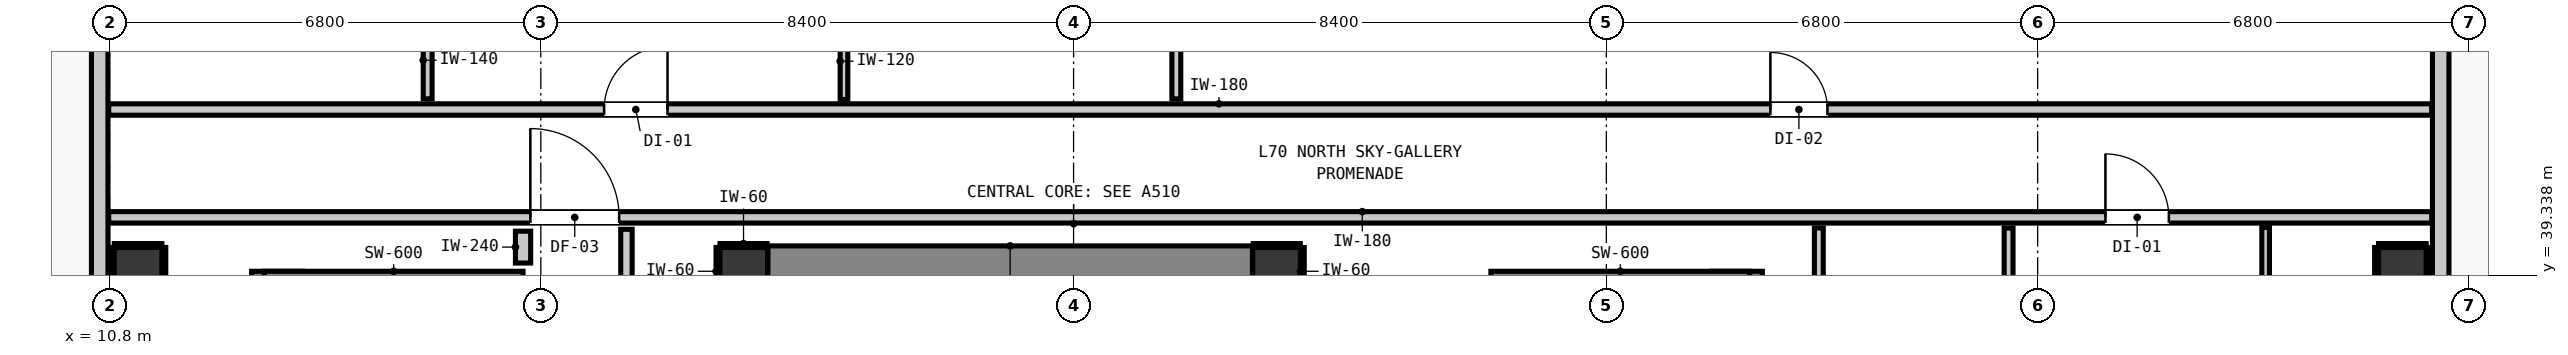
"""IFC4 building model, lengths in metres.
Left out: names, types, materials, properties, quantities, classifications, styles, units other than length and angle.
Written with IfcOpenShell. Run it as: python <this file> out.ifc"""

import sys

from ifc_helpers import new_model, si_unit, direction, frame, frame_2d, origin, origin_2d, place, context, subcontext, project, spatial, rectangle, extrude, element, fill, save


model = new_model("IFC4")
c1 = context("Model", 3, precision=1e-05, world=origin(), true_north=direction((0.0, 1.0)))
c2 = subcontext(c1, "Body", "Model", "MODEL_VIEW")
j1 = project(units=[si_unit("LENGTHUNIT", "METRE"), si_unit("PLANEANGLEUNIT", "RADIAN")], contexts=[c1])
p1 = place(None, origin())
s1 = spatial("IfcSite", under=j1, at=p1, CompositionType="ELEMENT")
p2 = place(p1, origin())
s2 = spatial("IfcBuilding", under=s1, at=p2, CompositionType="ELEMENT")
p3 = place(p2, frame((0.0, 0.0, 241.24)))
s3 = spatial("IfcBuildingStorey", under=s2, at=p3, CompositionType="ELEMENT", Elevation=241.24)
for number, where, z_axis, x_axis in (
    (1, (20.8, 39.4, 0.0), (0.0, 0.0, 1.0), (1.0, 0.0, 0.0)),
    (2, (29.2, 39.4, 0.0), (0.0, 0.0, 1.0), (1.0, 0.0, 0.0)),
):
    element("IfcColumn", number, at=place(p3, frame(where, z_axis=z_axis, x_axis=x_axis)), inside=s3, PredefinedType="COLUMN", context=c2, shape_type="SweptSolid", body=[
        extrude(rectangle(XDim=0.75, YDim=0.75, at=origin_2d()), origin(), (0.0, 0.0, 1.0), 3.32),
    ])
p4 = place(p3, frame((13.44, 31.08, 0.0), z_axis=(0.0, 0.0, 1.0), x_axis=(0.0, 1.0, 0.0)))
e3 = element("IfcWall", 3, at=p4, inside=s3, PredefinedType="SHEAR", context=c2, shape_type="SweptSolid", body=[
    extrude(rectangle(XDim=8.32, YDim=0.8, at=frame_2d((4.16, 0.0))), origin(), (0.0, 0.0, 1.0), 3.32),
])
p5 = place(p3, frame((13.24, 39.1, 0.0), z_axis=(0.0, 0.0, 1.0), x_axis=(1.0, 0.0, 0.0)))
e4 = element("IfcWall", 4, at=p5, inside=s3, PredefinedType="SHEAR", context=c2, shape_type="SweptSolid", body=[
    extrude(rectangle(XDim=4.08, YDim=0.6, at=frame_2d((2.04, 0.0))), origin(), (0.0, 0.0, 1.0), 3.32),
])
p6 = place(p3, frame((36.46, 31.08, 0.0), z_axis=(0.0, 0.0, 1.0), x_axis=(0.0, 1.0, 0.0)))
e5 = element("IfcWall", 5, at=p6, inside=s3, PredefinedType="SHEAR", context=c2, shape_type="SweptSolid", body=[
    extrude(rectangle(XDim=8.32, YDim=0.8, at=frame_2d((4.16, 0.0))), origin(), (0.0, 0.0, 1.0), 3.32),
])
p7 = place(p3, frame((32.58, 39.1, 0.0), z_axis=(0.0, 0.0, 1.0), x_axis=(1.0, 0.0, 0.0)))
e6 = element("IfcWall", 6, at=p7, inside=s3, PredefinedType="SHEAR", context=c2, shape_type="SweptSolid", body=[
    extrude(rectangle(XDim=4.08, YDim=0.6, at=frame_2d((2.04, 0.0))), origin(), (0.0, 0.0, 1.0), 3.32),
])
p8 = place(p3, frame((21.18, 39.4, 0.0), z_axis=(0.0, 0.0, 1.0), x_axis=(1.0, 0.0, 0.0)))
e7 = element("IfcWall", 7, at=p8, inside=s3, PredefinedType="SHEAR", context=c2, shape_type="SweptSolid", body=[
    extrude(rectangle(XDim=7.64, YDim=0.8, at=frame_2d((3.82, 0.0))), origin(), (0.0, 0.0, 1.0), 3.32),
])
for number, where, z_axis, x_axis in (
    (8, (11.25, 39.4, 0.0), (0.0, 0.0, 1.0), (1.0, 0.0, 0.0)),
    (9, (46.95, 39.4, 0.0), (0.0, 0.0, 1.0), (1.0, 0.0, 0.0)),
):
    element("IfcColumn", number, at=place(p3, frame(where, z_axis=z_axis, x_axis=x_axis)), inside=s3, PredefinedType="COLUMN", context=c2, shape_type="SweptSolid", body=[
        extrude(rectangle(XDim=0.75, YDim=0.75, at=origin_2d()), origin(), (0.0, 0.0, 1.0), 3.32),
    ])
p9 = place(p3, frame((10.645, 18.545, 0.0), z_axis=(0.0, 0.0, 1.0), x_axis=(0.0, 1.0, 0.0)))
e10 = element("IfcWall", 10, at=p9, inside=s3, PredefinedType="STANDARD", context=c2, shape_type="SweptSolid", body=[
    extrude(rectangle(XDim=30.31, YDim=0.26, at=frame_2d((15.155, 0.0))), origin(), (0.0, 0.0, 1.0), 3.1),
])
p10 = place(p9, frame((27.695, 0.0, 0.0)))
e11 = element("IfcOpeningElement", 11, at=p10, cuts=e10, PredefinedType="OPENING", context=c2, shape_type="SweptSolid", body=[
    extrude(rectangle(XDim=1.0, YDim=2.15, at=frame_2d((0.5, 1.075))), frame((0.0, 0.14, 0.0), z_axis=(0.0, -1.0, 0.0), x_axis=(1.0, 0.0, 0.0)), (0.0, 0.0, 1.0), 0.28),
])
p11 = place(p9, frame((29.108, 0.0, 0.85)))
e12 = element("IfcOpeningElement", 12, at=p11, cuts=e10, PredefinedType="OPENING", context=c2, shape_type="SweptSolid", body=[
    extrude(rectangle(XDim=0.9, YDim=1.5, at=frame_2d((0.45, 0.75))), frame((0.0, 0.14, 0.0), z_axis=(0.0, -1.0, 0.0), x_axis=(1.0, 0.0, 0.0)), (0.0, 0.0, 1.0), 0.28),
])
p12 = place(p3, frame((47.555, 48.855, 0.0), z_axis=(0.0, 0.0, 1.0), x_axis=(0.0, -1.0, 0.0)))
e13 = element("IfcWall", 13, at=p12, inside=s3, PredefinedType="STANDARD", context=c2, shape_type="SweptSolid", body=[
    extrude(rectangle(XDim=30.31, YDim=0.26, at=frame_2d((15.155, 0.0))), origin(), (0.0, 0.0, 1.0), 3.1),
])
p13 = place(p12, frame((0.91, 0.0, 0.0)))
e14 = element("IfcOpeningElement", 14, at=p13, cuts=e13, PredefinedType="OPENING", context=c2, shape_type="SweptSolid", body=[
    extrude(rectangle(XDim=1.0, YDim=2.15, at=frame_2d((0.5, 1.075))), frame((0.0, 0.14, 0.0), z_axis=(0.0, -1.0, 0.0), x_axis=(1.0, 0.0, 0.0)), (0.0, 0.0, 1.0), 0.28),
])
p14 = place(p12, frame((2.957, 0.0, 0.85)))
e15 = element("IfcOpeningElement", 15, at=p14, cuts=e13, PredefinedType="OPENING", context=c2, shape_type="SweptSolid", body=[
    extrude(rectangle(XDim=3.0, YDim=2.1, at=frame_2d((1.5, 1.05))), frame((0.0, 0.14, 0.0), z_axis=(0.0, -1.0, 0.0), x_axis=(1.0, 0.0, 0.0)), (0.0, 0.0, 1.0), 0.28),
])
p15 = place(p12, frame((21.005, 0.0, 0.85)))
e16 = element("IfcOpeningElement", 16, at=p15, cuts=e13, PredefinedType="OPENING", context=c2, shape_type="SweptSolid", body=[
    extrude(rectangle(XDim=3.0, YDim=2.1, at=frame_2d((1.5, 1.05))), frame((0.0, 0.14, 0.0), z_axis=(0.0, -1.0, 0.0), x_axis=(1.0, 0.0, 0.0)), (0.0, 0.0, 1.0), 0.28),
])
p16 = place(p3, frame((10.787, 40.25, 0.0), z_axis=(0.0, 0.0, 1.0), x_axis=(1.0, 0.0, 0.0)))
e17 = element("IfcWall", 17, at=p16, inside=s3, PredefinedType="PARTITIONING", context=c2, shape_type="SweptSolid", body=[
    extrude(rectangle(XDim=36.626, YDim=0.18, at=frame_2d((18.313, 0.0))), origin(), (0.0, 0.0, 1.0), 3.1),
])
p17 = place(p16, frame((6.648, 0.0, 0.0)))
e18 = element("IfcOpeningElement", 18, at=p17, cuts=e17, PredefinedType="OPENING", context=c2, shape_type="SweptSolid", body=[
    extrude(rectangle(XDim=1.4, YDim=2.15, at=frame_2d((0.7, 1.075))), frame((0.0, 0.1, 0.0), z_axis=(0.0, -1.0, 0.0), x_axis=(1.0, 0.0, 0.0)), (0.0, 0.0, 1.0), 0.2),
])
p18 = place(p16, frame((31.482, 0.0, 0.0)))
e19 = element("IfcOpeningElement", 19, at=p18, cuts=e17, PredefinedType="OPENING", context=c2, shape_type="SweptSolid", body=[
    extrude(rectangle(XDim=1.0, YDim=2.15, at=frame_2d((0.5, 1.075))), frame((0.0, 0.1, 0.0), z_axis=(0.0, -1.0, 0.0), x_axis=(1.0, 0.0, 0.0)), (0.0, 0.0, 1.0), 0.2),
])
p19 = place(p3, frame((10.787, 41.95, 0.0), z_axis=(0.0, 0.0, 1.0), x_axis=(1.0, 0.0, 0.0)))
e20 = element("IfcWall", 20, at=p19, inside=s3, PredefinedType="PARTITIONING", context=c2, shape_type="SweptSolid", body=[
    extrude(rectangle(XDim=36.626, YDim=0.18, at=frame_2d((18.313, 0.0))), origin(), (0.0, 0.0, 1.0), 3.1),
])
p20 = place(p19, frame((7.811, 0.0, 0.0)))
e21 = element("IfcOpeningElement", 21, at=p20, cuts=e20, PredefinedType="OPENING", context=c2, shape_type="SweptSolid", body=[
    extrude(rectangle(XDim=1.0, YDim=2.15, at=frame_2d((0.5, 1.075))), frame((0.0, 0.1, 0.0), z_axis=(0.0, -1.0, 0.0), x_axis=(1.0, 0.0, 0.0)), (0.0, 0.0, 1.0), 0.2),
])
p21 = place(p19, frame((26.199, 0.0, 0.0)))
e22 = element("IfcOpeningElement", 22, at=p21, cuts=e20, PredefinedType="OPENING", context=c2, shape_type="SweptSolid", body=[
    extrude(rectangle(XDim=0.9, YDim=2.1, at=frame_2d((0.45, 1.05))), frame((0.0, 0.1, 0.0), z_axis=(0.0, -1.0, 0.0), x_axis=(1.0, 0.0, 0.0)), (0.0, 0.0, 1.0), 0.2),
])
p22 = place(p3, frame((17.32, 39.53, 0.0), z_axis=(0.0, 0.0, 1.0), x_axis=(0.0, 1.0, 0.0)))
e23 = element("IfcWall", 23, at=p22, inside=s3, PredefinedType="PARTITIONING", context=c2, shape_type="SweptSolid", body=[
    extrude(rectangle(XDim=0.502, YDim=0.24, at=frame_2d((0.251, 0.0))), origin(), (0.0, 0.0, 1.0), 3.1),
])
p23 = place(p3, frame((18.95, 39.058, 0.0), z_axis=(0.0, 0.0, 1.0), x_axis=(0.0, 1.0, 0.0)))
e24 = element("IfcWall", 24, at=p23, inside=s3, PredefinedType="PARTITIONING", context=c2, shape_type="SweptSolid", body=[
    extrude(rectangle(XDim=1.004, YDim=0.18, at=frame_2d((0.502, 0.0))), origin(), (0.0, 0.0, 1.0), 3.1),
])
p24 = place(p3, frame((15.816, 42.118, 0.0), z_axis=(0.0, 0.0, 1.0), x_axis=(0.0, 1.0, 0.0)))
e25 = element("IfcWall", 25, at=p24, inside=s3, PredefinedType="PARTITIONING", context=c2, shape_type="SweptSolid", body=[
    extrude(rectangle(XDim=3.49, YDim=0.14, at=frame_2d((1.745, 0.0))), origin(), (0.0, 0.0, 1.0), 3.1),
])
p25 = place(p24, frame((1.318, 0.0, 0.0)))
e26 = element("IfcOpeningElement", 26, at=p25, cuts=e25, PredefinedType="OPENING", context=c2, shape_type="SweptSolid", body=[
    extrude(rectangle(XDim=0.86, YDim=2.02, at=frame_2d((0.43, 1.01))), frame((0.0, 0.08, 0.0), z_axis=(0.0, -1.0, 0.0), x_axis=(1.0, 0.0, 0.0)), (0.0, 0.0, 1.0), 0.16),
])
p26 = place(p3, frame((27.62, 42.118, 0.0), z_axis=(0.0, 0.0, 1.0), x_axis=(0.0, 1.0, 0.0)))
e27 = element("IfcWall", 27, at=p26, inside=s3, PredefinedType="PARTITIONING", context=c2, shape_type="SweptSolid", body=[
    extrude(rectangle(XDim=8.695, YDim=0.14, at=frame_2d((4.348, 0.0))), origin(), (0.0, 0.0, 1.0), 3.1),
])
p27 = place(p3, frame((37.75, 36.218, 0.0), z_axis=(0.0, 0.0, 1.0), x_axis=(0.0, 1.0, 0.0)))
e28 = element("IfcWall", 28, at=p27, inside=s3, PredefinedType="PARTITIONING", context=c2, shape_type="SweptSolid", body=[
    extrude(rectangle(XDim=3.864, YDim=0.14, at=frame_2d((1.932, 0.0))), origin(), (0.0, 0.0, 1.0), 3.1),
])
p28 = place(p3, frame((40.742, 36.218, 0.0), z_axis=(0.0, 0.0, 1.0), x_axis=(0.0, 1.0, 0.0)))
e29 = element("IfcWall", 29, at=p28, inside=s3, PredefinedType="PARTITIONING", context=c2, shape_type="SweptSolid", body=[
    extrude(rectangle(XDim=3.864, YDim=0.14, at=frame_2d((1.932, 0.0))), origin(), (0.0, 0.0, 1.0), 3.1),
])
p29 = place(p28, frame((1.414, 0.0, 0.0)))
e30 = element("IfcOpeningElement", 30, at=p29, cuts=e29, PredefinedType="OPENING", context=c2, shape_type="SweptSolid", body=[
    extrude(rectangle(XDim=0.86, YDim=2.02, at=frame_2d((0.43, 1.01))), frame((0.0, 0.08, 0.0), z_axis=(0.0, -1.0, 0.0), x_axis=(1.0, 0.0, 0.0)), (0.0, 0.0, 1.0), 0.16),
])
p30 = place(p3, frame((22.38, 42.108, 0.0), z_axis=(0.0, 0.0, 1.0), x_axis=(0.0, 1.0, 0.0)))
e31 = element("IfcWall", 31, at=p30, inside=s3, PredefinedType="PARTITIONING", context=c2, shape_type="SweptSolid", body=[
    extrude(rectangle(XDim=3.51, YDim=0.12, at=frame_2d((1.755, 0.0))), origin(), (0.0, 0.0, 1.0), 3.1),
])
p31 = place(p30, frame((1.308, 0.0, 0.0)))
e32 = element("IfcOpeningElement", 32, at=p31, cuts=e31, PredefinedType="OPENING", context=c2, shape_type="SweptSolid", body=[
    extrude(rectangle(XDim=0.9, YDim=2.1, at=frame_2d((0.45, 1.05))), frame((0.0, 0.07, 0.0), z_axis=(0.0, -1.0, 0.0), x_axis=(1.0, 0.0, 0.0)), (0.0, 0.0, 1.0), 0.14),
])
p32 = place(p3, frame((44.795, 30.828, 0.0), z_axis=(0.0, 0.0, 1.0), x_axis=(0.0, 1.0, 0.0)))
e33 = element("IfcWall", 33, at=p32, inside=s3, PredefinedType="PARTITIONING", context=c2, shape_type="SweptSolid", body=[
    extrude(rectangle(XDim=9.264, YDim=0.12, at=frame_2d((4.632, 0.0))), origin(), (0.0, 0.0, 1.0), 3.1),
])
p33 = place(p32, frame((4.197, 0.0, 0.0)))
e34 = element("IfcOpeningElement", 34, at=p33, cuts=e33, PredefinedType="OPENING", context=c2, shape_type="SweptSolid", body=[
    extrude(rectangle(XDim=0.9, YDim=2.1, at=frame_2d((0.45, 1.05))), frame((0.0, 0.07, 0.0), z_axis=(0.0, -1.0, 0.0), x_axis=(1.0, 0.0, 0.0)), (0.0, 0.0, 1.0), 0.14),
])
p34 = place(p3, frame((20.425, 39.807, 0.0), z_axis=(0.0, 0.0, 1.0), x_axis=(1.0, 0.0, 0.0)))
e35 = element("IfcWall", 35, at=p34, inside=s3, PredefinedType="PARTITIONING", context=c2, shape_type="SweptSolid", body=[
    extrude(rectangle(XDim=0.742, YDim=0.06, at=frame_2d((0.371, 0.0))), origin(), (0.0, 0.0, 1.0), 1.45),
])
p35 = place(p3, frame((20.393, 39.025, 0.0), z_axis=(0.0, 0.0, 1.0), x_axis=(0.0, 1.0, 0.0)))
e36 = element("IfcWall", 36, at=p35, inside=s3, PredefinedType="PARTITIONING", context=c2, shape_type="SweptSolid", body=[
    extrude(rectangle(XDim=0.75, YDim=0.06, at=frame_2d((0.375, 0.0))), origin(), (0.0, 0.0, 1.0), 1.45),
])
p36 = place(p3, frame((28.833, 39.807, 0.0), z_axis=(0.0, 0.0, 1.0), x_axis=(1.0, 0.0, 0.0)))
e37 = element("IfcWall", 37, at=p36, inside=s3, PredefinedType="PARTITIONING", context=c2, shape_type="SweptSolid", body=[
    extrude(rectangle(XDim=0.742, YDim=0.06, at=frame_2d((0.371, 0.0))), origin(), (0.0, 0.0, 1.0), 1.45),
])
for number, where, z_axis, x_axis in (
    (38, (29.607, 39.025, 0.0), (0.0, 0.0, 1.0), (0.0, 1.0, 0.0)),
    (39, (10.875, 39.807, 0.0), (0.0, 0.0, 1.0), (1.0, 0.0, 0.0)),
    (40, (10.843, 39.025, 0.0), (0.0, 0.0, 1.0), (0.0, 1.0, 0.0)),
    (41, (11.657, 39.025, 0.0), (0.0, 0.0, 1.0), (0.0, 1.0, 0.0)),
    (42, (46.575, 39.807, 0.0), (0.0, 0.0, 1.0), (1.0, 0.0, 0.0)),
    (43, (46.543, 39.025, 0.0), (0.0, 0.0, 1.0), (0.0, 1.0, 0.0)),
    (44, (47.357, 39.025, 0.0), (0.0, 0.0, 1.0), (0.0, 1.0, 0.0)),
):
    element("IfcWall", number, at=place(p3, frame(where, z_axis=z_axis, x_axis=x_axis)), inside=s3, PredefinedType="PARTITIONING", context=c2, shape_type="SweptSolid", body=[
        extrude(rectangle(XDim=0.75, YDim=0.06, at=frame_2d((0.375, 0.0))), origin(), (0.0, 0.0, 1.0), 1.45),
    ])
p37 = place(p17, origin())
e45 = element("IfcDoor", 45, at=p37, inside=s3, OperationType="SINGLE_SWING_LEFT", PredefinedType="DOOR", context=c2, shape_type="SweptSolid", body=[
    extrude(rectangle(XDim=1.4, YDim=2.15, at=frame_2d((0.7, 1.075))), frame((0.0, 0.025, 0.0), z_axis=(0.0, -1.0, 0.0), x_axis=(1.0, 0.0, 0.0)), (0.0, 0.0, 1.0), 0.05),
])
fill(e18, e45)
p38 = place(p20, origin())
e46 = element("IfcDoor", 46, at=p38, inside=s3, OperationType="SINGLE_SWING_RIGHT", PredefinedType="DOOR", context=c2, shape_type="SweptSolid", body=[
    extrude(rectangle(XDim=1.0, YDim=2.15, at=frame_2d((0.5, 1.075))), frame((0.0, 0.025, 0.0), z_axis=(0.0, -1.0, 0.0), x_axis=(1.0, 0.0, 0.0)), (0.0, 0.0, 1.0), 0.05),
])
fill(e21, e46)
p39 = place(p21, origin())
e47 = element("IfcDoor", 47, at=p39, inside=s3, OperationType="SINGLE_SWING_LEFT", PredefinedType="DOOR", context=c2, shape_type="SweptSolid", body=[
    extrude(rectangle(XDim=0.9, YDim=2.1, at=frame_2d((0.45, 1.05))), frame((0.0, 0.025, 0.0), z_axis=(0.0, -1.0, 0.0), x_axis=(1.0, 0.0, 0.0)), (0.0, 0.0, 1.0), 0.05),
])
fill(e22, e47)
p40 = place(p18, origin())
e48 = element("IfcDoor", 48, at=p40, inside=s3, OperationType="SINGLE_SWING_LEFT", PredefinedType="DOOR", context=c2, shape_type="SweptSolid", body=[
    extrude(rectangle(XDim=1.0, YDim=2.15, at=frame_2d((0.5, 1.075))), frame((0.0, 0.025, 0.0), z_axis=(0.0, -1.0, 0.0), x_axis=(1.0, 0.0, 0.0)), (0.0, 0.0, 1.0), 0.05),
])
fill(e19, e48)
save(model, sys.argv[1])
